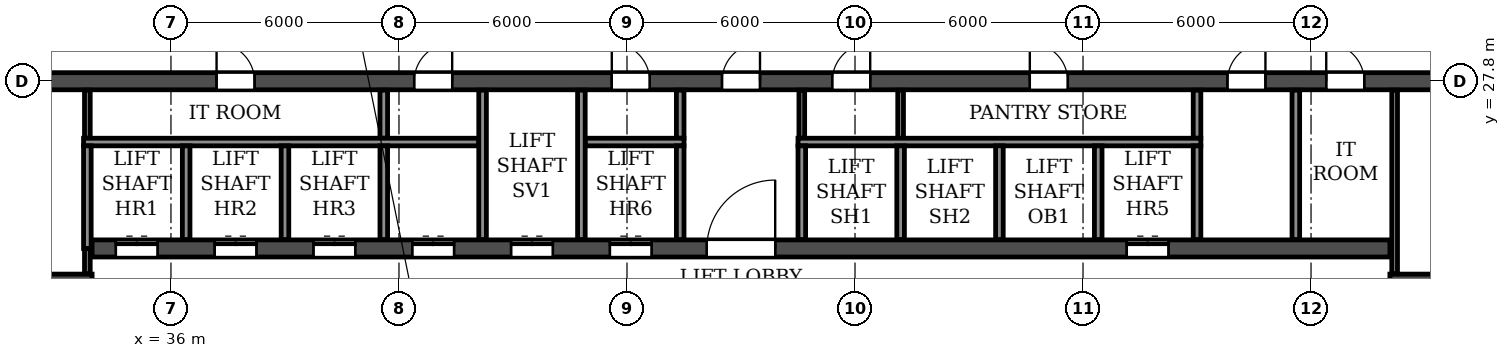
"""IFC4 building model, lengths in metres.
Left out: names, types, materials, properties, quantities, classifications, styles, units other than length and angle.
Written with IfcOpenShell. Run it as: python <this file> out.ifc"""

import sys

from ifc_helpers import new_model, si_unit, direction, frame, frame_2d, origin, place, context, subcontext, project, spatial, rectangle, extrude, element, fill, save


model = new_model("IFC4")
c1 = context("Model", 3, precision=1e-05, world=origin(), true_north=direction((0.0, 1.0)))
c2 = subcontext(c1, "Body", "Model", "MODEL_VIEW")
j1 = project(units=[si_unit("LENGTHUNIT", "METRE"), si_unit("PLANEANGLEUNIT", "RADIAN")], contexts=[c1])
p1 = place(None, origin())
s1 = spatial("IfcSite", under=j1, at=p1, CompositionType="ELEMENT")
p2 = place(p1, origin())
s2 = spatial("IfcBuilding", under=s1, at=p2, CompositionType="ELEMENT")
p3 = place(p2, frame((0.0, 0.0, 122.4)))
s3 = spatial("IfcBuildingStorey", under=s2, at=p3, CompositionType="ELEMENT", Elevation=122.4)
p4 = place(p3, frame((12.2, 27.8, 0.0), z_axis=(0.0, 0.0, 1.0), x_axis=(1.0, 0.0, 0.0)))
e1 = element("IfcWall", 1, at=p4, inside=s3, PredefinedType="SOLIDWALL", context=c2, shape_type="SweptSolid", body=[
    extrude(rectangle(XDim=77.6, YDim=0.45, at=frame_2d((38.8, 0.0))), origin(), (0.0, 0.0, 1.0), 3.07),
])
p5 = place(p4, frame((0.8, 0.0, 0.0)))
e2 = element("IfcOpeningElement", 2, at=p5, cuts=e1, PredefinedType="OPENING", context=c2, shape_type="SweptSolid", body=[
    extrude(rectangle(XDim=1.0, YDim=2.1, at=frame_2d((0.5, 1.05))), frame((0.0, 0.235, 0.0), z_axis=(0.0, -1.0, 0.0), x_axis=(1.0, 0.0, 0.0)), (0.0, 0.0, 1.0), 0.47),
])
p6 = place(p4, frame((3.8, 0.0, 0.0)))
e3 = element("IfcOpeningElement", 3, at=p6, cuts=e1, PredefinedType="OPENING", context=c2, shape_type="SweptSolid", body=[
    extrude(rectangle(XDim=1.0, YDim=2.1, at=frame_2d((0.5, 1.05))), frame((0.0, 0.235, 0.0), z_axis=(0.0, -1.0, 0.0), x_axis=(1.0, 0.0, 0.0)), (0.0, 0.0, 1.0), 0.47),
])
p7 = place(p4, frame((6.7, 0.0, 0.0)))
e4 = element("IfcOpeningElement", 4, at=p7, cuts=e1, PredefinedType="OPENING", context=c2, shape_type="SweptSolid", body=[
    extrude(rectangle(XDim=1.0, YDim=2.1, at=frame_2d((0.5, 1.05))), frame((0.0, 0.235, 0.0), z_axis=(0.0, -1.0, 0.0), x_axis=(1.0, 0.0, 0.0)), (0.0, 0.0, 1.0), 0.47),
])
p8 = place(p4, frame((10.05, 0.0, 0.0)))
e5 = element("IfcOpeningElement", 5, at=p8, cuts=e1, PredefinedType="OPENING", context=c2, shape_type="SweptSolid", body=[
    extrude(rectangle(XDim=0.9, YDim=2.1, at=frame_2d((0.45, 1.05))), frame((0.0, 0.235, 0.0), z_axis=(0.0, -1.0, 0.0), x_axis=(1.0, 0.0, 0.0)), (0.0, 0.0, 1.0), 0.47),
])
p9 = place(p4, frame((19.25, 0.0, 0.0)))
e6 = element("IfcOpeningElement", 6, at=p9, cuts=e1, PredefinedType="OPENING", context=c2, shape_type="SweptSolid", body=[
    extrude(rectangle(XDim=0.9, YDim=2.1, at=frame_2d((0.45, 1.05))), frame((0.0, 0.235, 0.0), z_axis=(0.0, -1.0, 0.0), x_axis=(1.0, 0.0, 0.0)), (0.0, 0.0, 1.0), 0.47),
])
p10 = place(p4, frame((25.0, 0.0, 0.0)))
e7 = element("IfcOpeningElement", 7, at=p10, cuts=e1, PredefinedType="OPENING", context=c2, shape_type="SweptSolid", body=[
    extrude(rectangle(XDim=1.0, YDim=2.1, at=frame_2d((0.5, 1.05))), frame((0.0, 0.235, 0.0), z_axis=(0.0, -1.0, 0.0), x_axis=(1.0, 0.0, 0.0)), (0.0, 0.0, 1.0), 0.47),
])
p11 = place(p4, frame((30.2, 0.0, 0.0)))
e8 = element("IfcOpeningElement", 8, at=p11, cuts=e1, PredefinedType="OPENING", context=c2, shape_type="SweptSolid", body=[
    extrude(rectangle(XDim=1.0, YDim=2.1, at=frame_2d((0.5, 1.05))), frame((0.0, 0.235, 0.0), z_axis=(0.0, -1.0, 0.0), x_axis=(1.0, 0.0, 0.0)), (0.0, 0.0, 1.0), 0.47),
])
p12 = place(p4, frame((35.4, 0.0, 0.0)))
e9 = element("IfcOpeningElement", 9, at=p12, cuts=e1, PredefinedType="OPENING", context=c2, shape_type="SweptSolid", body=[
    extrude(rectangle(XDim=1.0, YDim=2.1, at=frame_2d((0.5, 1.05))), frame((0.0, 0.235, 0.0), z_axis=(0.0, -1.0, 0.0), x_axis=(1.0, 0.0, 0.0)), (0.0, 0.0, 1.0), 0.47),
])
p13 = place(p4, frame((38.3, 0.0, 0.0)))
e10 = element("IfcOpeningElement", 10, at=p13, cuts=e1, PredefinedType="OPENING", context=c2, shape_type="SweptSolid", body=[
    extrude(rectangle(XDim=1.0, YDim=2.1, at=frame_2d((0.5, 1.05))), frame((0.0, 0.235, 0.0), z_axis=(0.0, -1.0, 0.0), x_axis=(1.0, 0.0, 0.0)), (0.0, 0.0, 1.0), 0.47),
])
p14 = place(p4, frame((41.2, 0.0, 0.0)))
e11 = element("IfcOpeningElement", 11, at=p14, cuts=e1, PredefinedType="OPENING", context=c2, shape_type="SweptSolid", body=[
    extrude(rectangle(XDim=1.0, YDim=2.1, at=frame_2d((0.5, 1.05))), frame((0.0, 0.235, 0.0), z_axis=(0.0, -1.0, 0.0), x_axis=(1.0, 0.0, 0.0)), (0.0, 0.0, 1.0), 0.47),
])
p15 = place(p4, frame((46.4, 0.0, 0.0)))
e12 = element("IfcOpeningElement", 12, at=p15, cuts=e1, PredefinedType="OPENING", context=c2, shape_type="SweptSolid", body=[
    extrude(rectangle(XDim=1.0, YDim=2.1, at=frame_2d((0.5, 1.05))), frame((0.0, 0.235, 0.0), z_axis=(0.0, -1.0, 0.0), x_axis=(1.0, 0.0, 0.0)), (0.0, 0.0, 1.0), 0.47),
])
p16 = place(p4, frame((51.6, 0.0, 0.0)))
e13 = element("IfcOpeningElement", 13, at=p16, cuts=e1, PredefinedType="OPENING", context=c2, shape_type="SweptSolid", body=[
    extrude(rectangle(XDim=1.0, YDim=2.1, at=frame_2d((0.5, 1.05))), frame((0.0, 0.235, 0.0), z_axis=(0.0, -1.0, 0.0), x_axis=(1.0, 0.0, 0.0)), (0.0, 0.0, 1.0), 0.47),
])
p17 = place(p4, frame((54.2, 0.0, 0.0)))
e14 = element("IfcOpeningElement", 14, at=p17, cuts=e1, PredefinedType="OPENING", context=c2, shape_type="SweptSolid", body=[
    extrude(rectangle(XDim=1.0, YDim=2.1, at=frame_2d((0.5, 1.05))), frame((0.0, 0.235, 0.0), z_axis=(0.0, -1.0, 0.0), x_axis=(1.0, 0.0, 0.0)), (0.0, 0.0, 1.0), 0.47),
])
p18 = place(p4, frame((57.45, 0.0, 0.0)))
e15 = element("IfcOpeningElement", 15, at=p18, cuts=e1, PredefinedType="OPENING", context=c2, shape_type="SweptSolid", body=[
    extrude(rectangle(XDim=0.9, YDim=2.1, at=frame_2d((0.45, 1.05))), frame((0.0, 0.235, 0.0), z_axis=(0.0, -1.0, 0.0), x_axis=(1.0, 0.0, 0.0)), (0.0, 0.0, 1.0), 0.47),
])
p19 = place(p4, frame((66.65, 0.0, 0.0)))
e16 = element("IfcOpeningElement", 16, at=p19, cuts=e1, PredefinedType="OPENING", context=c2, shape_type="SweptSolid", body=[
    extrude(rectangle(XDim=0.9, YDim=2.1, at=frame_2d((0.45, 1.05))), frame((0.0, 0.235, 0.0), z_axis=(0.0, -1.0, 0.0), x_axis=(1.0, 0.0, 0.0)), (0.0, 0.0, 1.0), 0.47),
])
p20 = place(p4, frame((69.9, 0.0, 0.0)))
e17 = element("IfcOpeningElement", 17, at=p20, cuts=e1, PredefinedType="OPENING", context=c2, shape_type="SweptSolid", body=[
    extrude(rectangle(XDim=1.0, YDim=2.1, at=frame_2d((0.5, 1.05))), frame((0.0, 0.235, 0.0), z_axis=(0.0, -1.0, 0.0), x_axis=(1.0, 0.0, 0.0)), (0.0, 0.0, 1.0), 0.47),
])
p21 = place(p4, frame((72.8, 0.0, 0.0)))
e18 = element("IfcOpeningElement", 18, at=p21, cuts=e1, PredefinedType="OPENING", context=c2, shape_type="SweptSolid", body=[
    extrude(rectangle(XDim=1.0, YDim=2.1, at=frame_2d((0.5, 1.05))), frame((0.0, 0.235, 0.0), z_axis=(0.0, -1.0, 0.0), x_axis=(1.0, 0.0, 0.0)), (0.0, 0.0, 1.0), 0.47),
])
p22 = place(p4, frame((75.8, 0.0, 0.0)))
e19 = element("IfcOpeningElement", 19, at=p22, cuts=e1, PredefinedType="OPENING", context=c2, shape_type="SweptSolid", body=[
    extrude(rectangle(XDim=1.0, YDim=2.1, at=frame_2d((0.5, 1.05))), frame((0.0, 0.235, 0.0), z_axis=(0.0, -1.0, 0.0), x_axis=(1.0, 0.0, 0.0)), (0.0, 0.0, 1.0), 0.47),
])
p23 = place(p3, frame((33.925, 23.4, 0.0), z_axis=(0.0, 0.0, 1.0), x_axis=(1.0, 0.0, 0.0)))
e20 = element("IfcWall", 20, at=p23, inside=s3, PredefinedType="SOLIDWALL", context=c2, shape_type="SweptSolid", body=[
    extrude(rectangle(XDim=34.15, YDim=0.45, at=frame_2d((17.075, 0.0))), origin(), (0.0, 0.0, 1.0), 3.07),
])
p24 = place(p23, frame((16.175, 0.0, 0.0)))
e21 = element("IfcOpeningElement", 21, at=p24, cuts=e20, PredefinedType="OPENING", context=c2, shape_type="SweptSolid", body=[
    extrude(rectangle(XDim=1.8, YDim=2.1, at=frame_2d((0.9, 1.05))), frame((0.0, 0.235, 0.0), z_axis=(0.0, -1.0, 0.0), x_axis=(1.0, 0.0, 0.0)), (0.0, 0.0, 1.0), 0.47),
])
p25 = place(p23, frame((0.625, 0.0, 0.0)))
e22 = element("IfcOpeningElement", 22, at=p25, cuts=e20, PredefinedType="OPENING", context=c2, shape_type="SweptSolid", body=[
    extrude(rectangle(XDim=1.1, YDim=2.1, at=frame_2d((0.55, 1.05))), frame((0.0, 0.235, 0.0), z_axis=(0.0, -1.0, 0.0), x_axis=(1.0, 0.0, 0.0)), (0.0, 0.0, 1.0), 0.47),
])
p26 = place(p23, frame((3.225, 0.0, 0.0)))
e23 = element("IfcOpeningElement", 23, at=p26, cuts=e20, PredefinedType="OPENING", context=c2, shape_type="SweptSolid", body=[
    extrude(rectangle(XDim=1.1, YDim=2.1, at=frame_2d((0.55, 1.05))), frame((0.0, 0.235, 0.0), z_axis=(0.0, -1.0, 0.0), x_axis=(1.0, 0.0, 0.0)), (0.0, 0.0, 1.0), 0.47),
])
p27 = place(p23, frame((5.825, 0.0, 0.0)))
e24 = element("IfcOpeningElement", 24, at=p27, cuts=e20, PredefinedType="OPENING", context=c2, shape_type="SweptSolid", body=[
    extrude(rectangle(XDim=1.1, YDim=2.1, at=frame_2d((0.55, 1.05))), frame((0.0, 0.235, 0.0), z_axis=(0.0, -1.0, 0.0), x_axis=(1.0, 0.0, 0.0)), (0.0, 0.0, 1.0), 0.47),
])
p28 = place(p23, frame((8.425, 0.0, 0.0)))
e25 = element("IfcOpeningElement", 25, at=p28, cuts=e20, PredefinedType="OPENING", context=c2, shape_type="SweptSolid", body=[
    extrude(rectangle(XDim=1.1, YDim=2.1, at=frame_2d((0.55, 1.05))), frame((0.0, 0.235, 0.0), z_axis=(0.0, -1.0, 0.0), x_axis=(1.0, 0.0, 0.0)), (0.0, 0.0, 1.0), 0.47),
])
p29 = place(p23, frame((11.025, 0.0, 0.0)))
e26 = element("IfcOpeningElement", 26, at=p29, cuts=e20, PredefinedType="OPENING", context=c2, shape_type="SweptSolid", body=[
    extrude(rectangle(XDim=1.1, YDim=2.1, at=frame_2d((0.55, 1.05))), frame((0.0, 0.235, 0.0), z_axis=(0.0, -1.0, 0.0), x_axis=(1.0, 0.0, 0.0)), (0.0, 0.0, 1.0), 0.47),
])
p30 = place(p23, frame((13.625, 0.0, 0.0)))
e27 = element("IfcOpeningElement", 27, at=p30, cuts=e20, PredefinedType="OPENING", context=c2, shape_type="SweptSolid", body=[
    extrude(rectangle(XDim=1.1, YDim=2.1, at=frame_2d((0.55, 1.05))), frame((0.0, 0.235, 0.0), z_axis=(0.0, -1.0, 0.0), x_axis=(1.0, 0.0, 0.0)), (0.0, 0.0, 1.0), 0.47),
])
p31 = place(p23, frame((27.225, 0.0, 0.0)))
e28 = element("IfcOpeningElement", 28, at=p31, cuts=e20, PredefinedType="OPENING", context=c2, shape_type="SweptSolid", body=[
    extrude(rectangle(XDim=1.1, YDim=2.1, at=frame_2d((0.55, 1.05))), frame((0.0, 0.235, 0.0), z_axis=(0.0, -1.0, 0.0), x_axis=(1.0, 0.0, 0.0)), (0.0, 0.0, 1.0), 0.47),
])
for number, where, z_axis, x_axis in (
    (29, (29.875, 22.6, 0.0), (0.0, 0.0, 1.0), (1.0, 0.0, 0.0)),
    (30, (68.075, 22.6, 0.0), (0.0, 0.0, 1.0), (1.0, 0.0, 0.0)),
):
    element("IfcWall", number, at=place(p3, frame(where, z_axis=z_axis, x_axis=x_axis)), inside=s3, PredefinedType="SOLIDWALL", context=c2, shape_type="SweptSolid", body=[
        extrude(rectangle(XDim=4.05, YDim=0.25, at=frame_2d((2.025, 0.0))), origin(), (0.0, 0.0, 1.0), 3.07),
    ])
for number, where, z_axis, x_axis in (
    (31, (52.6, 26.3, 0.0), (0.0, 0.0, 1.0), (0.0, 1.0, 0.0)),
    (32, (55.2, 26.3, 0.0), (0.0, 0.0, 1.0), (0.0, 1.0, 0.0)),
):
    element("IfcWall", number, at=place(p3, frame(where, z_axis=z_axis, x_axis=x_axis)), inside=s3, PredefinedType="PARTITIONING", context=c2, shape_type="SweptSolid", body=[
        extrude(rectangle(XDim=1.265, YDim=0.15, at=frame_2d((0.632, 0.0))), origin(), (0.0, 0.0, 1.0), 3.07),
    ])
for number, where, z_axis, x_axis in (
    (33, (41.6, 26.3, 0.0), (0.0, 0.0, 1.0), (0.0, 1.0, 0.0)),
    (34, (49.4, 26.3, 0.0), (0.0, 0.0, 1.0), (0.0, 1.0, 0.0)),
    (35, (63.0, 26.3, 0.0), (0.0, 0.0, 1.0), (0.0, 1.0, 0.0)),
):
    element("IfcWall", number, at=place(p3, frame(where, z_axis=z_axis, x_axis=x_axis)), inside=s3, PredefinedType="PARTITIONING", context=c2, shape_type="SweptSolid", body=[
        extrude(rectangle(XDim=1.265, YDim=0.2, at=frame_2d((0.632, 0.0))), origin(), (0.0, 0.0, 1.0), 3.07),
    ])
p32 = place(p3, frame((65.6, 23.635, 0.0), z_axis=(0.0, 0.0, 1.0), x_axis=(0.0, 1.0, 0.0)))
e36 = element("IfcWall", 36, at=p32, inside=s3, PredefinedType="PARTITIONING", context=c2, shape_type="SweptSolid", body=[
    extrude(rectangle(XDim=3.93, YDim=0.2, at=frame_2d((1.965, 0.0))), origin(), (0.0, 0.0, 1.0), 3.07),
])
p33 = place(p3, frame((33.8, 22.735, 0.0), z_axis=(0.0, 0.0, 1.0), x_axis=(0.0, 1.0, 0.0)))
e37 = element("IfcWall", 37, at=p33, inside=s3, PredefinedType="PARTITIONING", context=c2, shape_type="SweptSolid", body=[
    extrude(rectangle(XDim=0.665, YDim=0.15, at=frame_2d((0.333, 0.0))), origin(), (0.0, 0.0, 1.0), 3.07),
])
p34 = place(p3, frame((33.8, 26.3, 0.0), z_axis=(0.0, 0.0, 1.0), x_axis=(0.0, 1.0, 0.0)))
e38 = element("IfcWall", 38, at=p34, inside=s3, PredefinedType="PARTITIONING", context=c2, shape_type="SweptSolid", body=[
    extrude(rectangle(XDim=1.265, YDim=0.15, at=frame_2d((0.632, 0.0))), origin(), (0.0, 0.0, 1.0), 3.07),
])
p35 = place(p3, frame((68.2, 22.735, 0.0), z_axis=(0.0, 0.0, 1.0), x_axis=(0.0, 1.0, 0.0)))
e39 = element("IfcWall", 39, at=p35, inside=s3, PredefinedType="PARTITIONING", context=c2, shape_type="SweptSolid", body=[
    extrude(rectangle(XDim=4.83, YDim=0.15, at=frame_2d((2.415, 0.0))), origin(), (0.0, 0.0, 1.0), 3.07),
])
p36 = place(p3, frame((33.7, 26.2, 0.0), z_axis=(0.0, 0.0, 1.0), x_axis=(1.0, 0.0, 0.0)))
e40 = element("IfcWall", 40, at=p36, inside=s3, PredefinedType="PARTITIONING", context=c2, shape_type="SweptSolid", body=[
    extrude(rectangle(XDim=10.4, YDim=0.2, at=frame_2d((5.2, 0.0))), origin(), (0.0, 0.0, 1.0), 3.07),
])
p37 = place(p3, frame((46.9, 26.2, 0.0), z_axis=(0.0, 0.0, 1.0), x_axis=(1.0, 0.0, 0.0)))
e41 = element("IfcWall", 41, at=p37, inside=s3, PredefinedType="PARTITIONING", context=c2, shape_type="SweptSolid", body=[
    extrude(rectangle(XDim=2.6, YDim=0.2, at=frame_2d((1.3, 0.0))), origin(), (0.0, 0.0, 1.0), 3.07),
])
p38 = place(p3, frame((52.5, 26.2, 0.0), z_axis=(0.0, 0.0, 1.0), x_axis=(1.0, 0.0, 0.0)))
e42 = element("IfcWall", 42, at=p38, inside=s3, PredefinedType="PARTITIONING", context=c2, shape_type="SweptSolid", body=[
    extrude(rectangle(XDim=10.6, YDim=0.2, at=frame_2d((5.3, 0.0))), origin(), (0.0, 0.0, 1.0), 3.07),
])
p39 = place(p3, frame((33.8, 23.4, 0.0), z_axis=(0.0, 0.0, 1.0), x_axis=(0.0, 1.0, 0.0)))
e43 = element("IfcWall", 43, at=p39, inside=s3, PredefinedType="PARTITIONING", context=c2, shape_type="SweptSolid", body=[
    extrude(rectangle(XDim=2.7, YDim=0.2, at=frame_2d((1.35, 0.0))), origin(), (0.0, 0.0, 1.0), 3.07),
])
for number, where, z_axis, x_axis in (
    (44, (36.4, 23.635, 0.0), (0.0, 0.0, 1.0), (0.0, 1.0, 0.0)),
    (45, (39.0, 23.635, 0.0), (0.0, 0.0, 1.0), (0.0, 1.0, 0.0)),
    (46, (41.6, 23.635, 0.0), (0.0, 0.0, 1.0), (0.0, 1.0, 0.0)),
):
    element("IfcWall", number, at=place(p3, frame(where, z_axis=z_axis, x_axis=x_axis)), inside=s3, PredefinedType="PARTITIONING", context=c2, shape_type="SweptSolid", body=[
        extrude(rectangle(XDim=2.465, YDim=0.2, at=frame_2d((1.232, 0.0))), origin(), (0.0, 0.0, 1.0), 3.07),
    ])
for number, where, z_axis, x_axis in (
    (47, (44.2, 23.635, 0.0), (0.0, 0.0, 1.0), (0.0, 1.0, 0.0)),
    (48, (46.8, 23.635, 0.0), (0.0, 0.0, 1.0), (0.0, 1.0, 0.0)),
):
    element("IfcWall", number, at=place(p3, frame(where, z_axis=z_axis, x_axis=x_axis)), inside=s3, PredefinedType="PARTITIONING", context=c2, shape_type="SweptSolid", body=[
        extrude(rectangle(XDim=3.93, YDim=0.2, at=frame_2d((1.965, 0.0))), origin(), (0.0, 0.0, 1.0), 3.07),
    ])
for number, where, z_axis, x_axis in (
    (49, (49.4, 23.635, 0.0), (0.0, 0.0, 1.0), (0.0, 1.0, 0.0)),
    (50, (52.6, 23.635, 0.0), (0.0, 0.0, 1.0), (0.0, 1.0, 0.0)),
    (51, (55.2, 23.635, 0.0), (0.0, 0.0, 1.0), (0.0, 1.0, 0.0)),
    (52, (57.8, 23.635, 0.0), (0.0, 0.0, 1.0), (0.0, 1.0, 0.0)),
    (53, (60.4, 23.635, 0.0), (0.0, 0.0, 1.0), (0.0, 1.0, 0.0)),
    (54, (63.0, 23.635, 0.0), (0.0, 0.0, 1.0), (0.0, 1.0, 0.0)),
):
    element("IfcWall", number, at=place(p3, frame(where, z_axis=z_axis, x_axis=x_axis)), inside=s3, PredefinedType="PARTITIONING", context=c2, shape_type="SweptSolid", body=[
        extrude(rectangle(XDim=2.465, YDim=0.2, at=frame_2d((1.232, 0.0))), origin(), (0.0, 0.0, 1.0), 3.07),
    ])
p40 = place(p10, origin())
e55 = element("IfcDoor", 55, at=p40, inside=s3, OperationType="SINGLE_SWING_LEFT", PredefinedType="DOOR", context=c2, shape_type="SweptSolid", body=[
    extrude(rectangle(XDim=1.0, YDim=2.1, at=frame_2d((0.5, 1.05))), frame((0.0, 0.025, 0.0), z_axis=(0.0, -1.0, 0.0), x_axis=(1.0, 0.0, 0.0)), (0.0, 0.0, 1.0), 0.05),
])
fill(e7, e55)
p41 = place(p11, origin())
e56 = element("IfcDoor", 56, at=p41, inside=s3, OperationType="SINGLE_SWING_RIGHT", PredefinedType="DOOR", context=c2, shape_type="SweptSolid", body=[
    extrude(rectangle(XDim=1.0, YDim=2.1, at=frame_2d((0.5, 1.05))), frame((0.0, 0.025, 0.0), z_axis=(0.0, -1.0, 0.0), x_axis=(1.0, 0.0, 0.0)), (0.0, 0.0, 1.0), 0.05),
])
fill(e8, e56)
p42 = place(p12, origin())
e57 = element("IfcDoor", 57, at=p42, inside=s3, OperationType="SINGLE_SWING_LEFT", PredefinedType="DOOR", context=c2, shape_type="SweptSolid", body=[
    extrude(rectangle(XDim=1.0, YDim=2.1, at=frame_2d((0.5, 1.05))), frame((0.0, 0.025, 0.0), z_axis=(0.0, -1.0, 0.0), x_axis=(1.0, 0.0, 0.0)), (0.0, 0.0, 1.0), 0.05),
])
fill(e9, e57)
p43 = place(p13, origin())
e58 = element("IfcDoor", 58, at=p43, inside=s3, OperationType="SINGLE_SWING_RIGHT", PredefinedType="DOOR", context=c2, shape_type="SweptSolid", body=[
    extrude(rectangle(XDim=1.0, YDim=2.1, at=frame_2d((0.5, 1.05))), frame((0.0, 0.025, 0.0), z_axis=(0.0, -1.0, 0.0), x_axis=(1.0, 0.0, 0.0)), (0.0, 0.0, 1.0), 0.05),
])
fill(e10, e58)
p44 = place(p14, origin())
e59 = element("IfcDoor", 59, at=p44, inside=s3, OperationType="SINGLE_SWING_RIGHT", PredefinedType="DOOR", context=c2, shape_type="SweptSolid", body=[
    extrude(rectangle(XDim=1.0, YDim=2.1, at=frame_2d((0.5, 1.05))), frame((0.0, 0.025, 0.0), z_axis=(0.0, -1.0, 0.0), x_axis=(1.0, 0.0, 0.0)), (0.0, 0.0, 1.0), 0.05),
])
fill(e11, e59)
p45 = place(p15, origin())
e60 = element("IfcDoor", 60, at=p45, inside=s3, OperationType="SINGLE_SWING_LEFT", PredefinedType="DOOR", context=c2, shape_type="SweptSolid", body=[
    extrude(rectangle(XDim=1.0, YDim=2.1, at=frame_2d((0.5, 1.05))), frame((0.0, 0.025, 0.0), z_axis=(0.0, -1.0, 0.0), x_axis=(1.0, 0.0, 0.0)), (0.0, 0.0, 1.0), 0.05),
])
fill(e12, e60)
p46 = place(p16, origin())
e61 = element("IfcDoor", 61, at=p46, inside=s3, OperationType="SINGLE_SWING_RIGHT", PredefinedType="DOOR", context=c2, shape_type="SweptSolid", body=[
    extrude(rectangle(XDim=1.0, YDim=2.1, at=frame_2d((0.5, 1.05))), frame((0.0, 0.025, 0.0), z_axis=(0.0, -1.0, 0.0), x_axis=(1.0, 0.0, 0.0)), (0.0, 0.0, 1.0), 0.05),
])
fill(e13, e61)
p47 = place(p17, origin())
e62 = element("IfcDoor", 62, at=p47, inside=s3, OperationType="SINGLE_SWING_LEFT", PredefinedType="DOOR", context=c2, shape_type="SweptSolid", body=[
    extrude(rectangle(XDim=1.0, YDim=2.1, at=frame_2d((0.5, 1.05))), frame((0.0, 0.025, 0.0), z_axis=(0.0, -1.0, 0.0), x_axis=(1.0, 0.0, 0.0)), (0.0, 0.0, 1.0), 0.05),
])
fill(e14, e62)
p48 = place(p24, origin())
e63 = element("IfcDoor", 63, at=p48, inside=s3, OperationType="DOUBLE_DOOR_SINGLE_SWING", PredefinedType="DOOR", context=c2, shape_type="SweptSolid", body=[
    extrude(rectangle(XDim=1.8, YDim=2.1, at=frame_2d((0.9, 1.05))), frame((0.0, 0.025, 0.0), z_axis=(0.0, -1.0, 0.0), x_axis=(1.0, 0.0, 0.0)), (0.0, 0.0, 1.0), 0.05),
])
fill(e21, e63)
p49 = place(p25, origin())
e64 = element("IfcDoor", 64, at=p49, inside=s3, OperationType="DOUBLE_DOOR_SLIDING", PredefinedType="DOOR", context=c2, shape_type="SweptSolid", body=[
    extrude(rectangle(XDim=1.1, YDim=2.1, at=frame_2d((0.55, 1.05))), frame((0.0, 0.025, 0.0), z_axis=(0.0, -1.0, 0.0), x_axis=(1.0, 0.0, 0.0)), (0.0, 0.0, 1.0), 0.05),
])
fill(e22, e64)
p50 = place(p26, origin())
e65 = element("IfcDoor", 65, at=p50, inside=s3, OperationType="DOUBLE_DOOR_SLIDING", PredefinedType="DOOR", context=c2, shape_type="SweptSolid", body=[
    extrude(rectangle(XDim=1.1, YDim=2.1, at=frame_2d((0.55, 1.05))), frame((0.0, 0.025, 0.0), z_axis=(0.0, -1.0, 0.0), x_axis=(1.0, 0.0, 0.0)), (0.0, 0.0, 1.0), 0.05),
])
fill(e23, e65)
p51 = place(p27, origin())
e66 = element("IfcDoor", 66, at=p51, inside=s3, OperationType="DOUBLE_DOOR_SLIDING", PredefinedType="DOOR", context=c2, shape_type="SweptSolid", body=[
    extrude(rectangle(XDim=1.1, YDim=2.1, at=frame_2d((0.55, 1.05))), frame((0.0, 0.025, 0.0), z_axis=(0.0, -1.0, 0.0), x_axis=(1.0, 0.0, 0.0)), (0.0, 0.0, 1.0), 0.05),
])
fill(e24, e66)
p52 = place(p28, origin())
e67 = element("IfcDoor", 67, at=p52, inside=s3, OperationType="DOUBLE_DOOR_SLIDING", PredefinedType="DOOR", context=c2, shape_type="SweptSolid", body=[
    extrude(rectangle(XDim=1.1, YDim=2.1, at=frame_2d((0.55, 1.05))), frame((0.0, 0.025, 0.0), z_axis=(0.0, -1.0, 0.0), x_axis=(1.0, 0.0, 0.0)), (0.0, 0.0, 1.0), 0.05),
])
fill(e25, e67)
p53 = place(p29, origin())
e68 = element("IfcDoor", 68, at=p53, inside=s3, OperationType="DOUBLE_DOOR_SLIDING", PredefinedType="DOOR", context=c2, shape_type="SweptSolid", body=[
    extrude(rectangle(XDim=1.1, YDim=2.1, at=frame_2d((0.55, 1.05))), frame((0.0, 0.025, 0.0), z_axis=(0.0, -1.0, 0.0), x_axis=(1.0, 0.0, 0.0)), (0.0, 0.0, 1.0), 0.05),
])
fill(e26, e68)
p54 = place(p30, origin())
e69 = element("IfcDoor", 69, at=p54, inside=s3, OperationType="DOUBLE_DOOR_SLIDING", PredefinedType="DOOR", context=c2, shape_type="SweptSolid", body=[
    extrude(rectangle(XDim=1.1, YDim=2.1, at=frame_2d((0.55, 1.05))), frame((0.0, 0.025, 0.0), z_axis=(0.0, -1.0, 0.0), x_axis=(1.0, 0.0, 0.0)), (0.0, 0.0, 1.0), 0.05),
])
fill(e27, e69)
p55 = place(p31, origin())
e70 = element("IfcDoor", 70, at=p55, inside=s3, OperationType="DOUBLE_DOOR_SLIDING", PredefinedType="DOOR", context=c2, shape_type="SweptSolid", body=[
    extrude(rectangle(XDim=1.1, YDim=2.1, at=frame_2d((0.55, 1.05))), frame((0.0, 0.025, 0.0), z_axis=(0.0, -1.0, 0.0), x_axis=(1.0, 0.0, 0.0)), (0.0, 0.0, 1.0), 0.05),
])
fill(e28, e70)
save(model, sys.argv[1])
